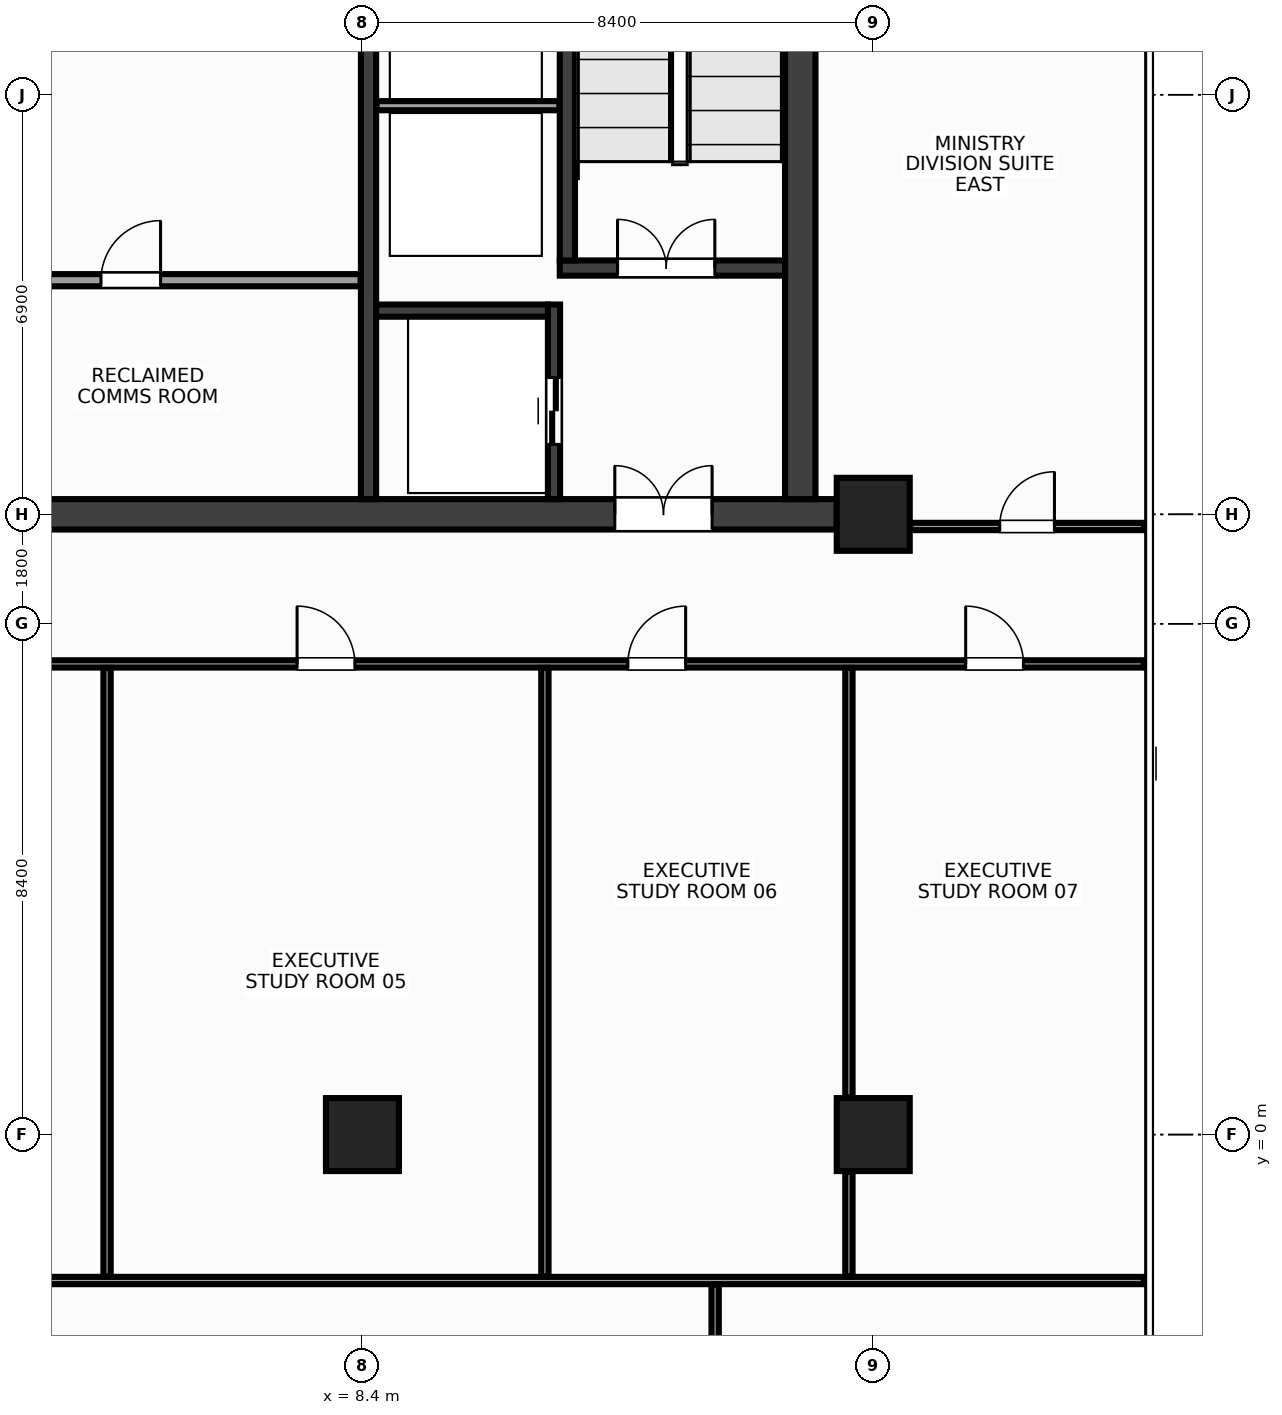
"""IFC4 building model, lengths in metres.
Left out: names, types, materials, properties, quantities, classifications, styles, units other than length and angle.
Written with IfcOpenShell. Run it as: python <this file> out.ifc"""

import sys

from ifc_helpers import new_model, si_unit, direction, frame, frame_2d, origin, origin_2d, place, context, subcontext, project, spatial, rectangle, extrude, source, transform, mapped, element, fill, save


model = new_model("IFC4")
c1 = context("Model", 3, precision=1e-05, world=origin(), true_north=direction((0.0, 1.0)))
c2 = subcontext(c1, "Body", "Model", "MODEL_VIEW")
j1 = project(units=[si_unit("LENGTHUNIT", "METRE"), si_unit("PLANEANGLEUNIT", "RADIAN")], contexts=[c1])
p1 = place(None, origin())
s1 = spatial("IfcSite", under=j1, at=p1, CompositionType="ELEMENT")
p2 = place(p1, origin())
s2 = spatial("IfcBuilding", under=s1, at=p2, CompositionType="ELEMENT")
p3 = place(p2, frame((0.0, 0.0, 275.6)))
s3 = spatial("IfcBuildingStorey", under=s2, at=p3, CompositionType="ELEMENT", Elevation=275.6)
m1 = source(origin(), c2, "Body", "SweptSolid", [
    extrude(rectangle(XDim=32.4, YDim=0.5, at=frame_2d((16.2, 0.0))), origin(), (0.0, 0.0, 1.0), 3.6),
])
p4 = place(p3, frame((-16.2, 10.2, 0.0), z_axis=(0.0, 0.0, 1.0), x_axis=(1.0, 0.0, 0.0)))
e1 = element("IfcWall", 1, at=p4, inside=s3, PredefinedType="SHEAR", context=c2, shape_type="MappedRepresentation", body=[
    mapped(m1, transform((0.0, 0.0, 0.0), x_axis=(1.0, 0.0, 0.0), y_axis=(0.0, 1.0, 0.0), z_axis=(0.0, 0.0, 1.0), scale=1.0)),
])
p5 = place(p4, frame((2.05, 0.0, 0.0)))
e2 = element("IfcOpeningElement", 2, at=p5, cuts=e1, PredefinedType="OPENING", context=c2, shape_type="SweptSolid", body=[
    extrude(rectangle(XDim=1.6, YDim=2.15, at=frame_2d((0.8, 1.075))), frame((0.0, 0.262, 0.0), z_axis=(0.0, -1.0, 0.0), x_axis=(1.0, 0.0, 0.0)), (0.0, 0.0, 1.0), 0.524),
])
p6 = place(p4, frame((28.75, 0.0, 0.0)))
e3 = element("IfcOpeningElement", 3, at=p6, cuts=e1, PredefinedType="OPENING", context=c2, shape_type="SweptSolid", body=[
    extrude(rectangle(XDim=1.6, YDim=2.15, at=frame_2d((0.8, 1.075))), frame((0.0, 0.262, 0.0), z_axis=(0.0, -1.0, 0.0), x_axis=(1.0, 0.0, 0.0)), (0.0, 0.0, 1.0), 0.524),
])
p7 = place(p4, frame((15.45, 0.0, 0.0)))
e4 = element("IfcOpeningElement", 4, at=p7, cuts=e1, PredefinedType="OPENING", context=c2, shape_type="SweptSolid", body=[
    extrude(rectangle(XDim=1.5, YDim=2.2, at=frame_2d((0.75, 1.1))), frame((0.0, 0.262, 0.0), z_axis=(0.0, -1.0, 0.0), x_axis=(1.0, 0.0, 0.0)), (0.0, 0.0, 1.0), 0.524),
])
m2 = source(origin(), c2, "Body", "SweptSolid", [
    extrude(rectangle(XDim=13.1, YDim=0.5, at=frame_2d((6.55, 0.0))), origin(), (0.0, 0.0, 1.0), 3.6),
])
p8 = place(p3, frame((15.6, 10.45, 0.0), z_axis=(0.0, 0.0, 1.0), x_axis=(0.0, 1.0, 0.0)))
e5 = element("IfcWall", 5, at=p8, inside=s3, PredefinedType="SHEAR", context=c2, shape_type="MappedRepresentation", body=[
    mapped(m2, transform((0.0, 0.0, 0.0), x_axis=(1.0, 0.0, 0.0), y_axis=(0.0, 1.0, 0.0), z_axis=(0.0, 0.0, 1.0), scale=1.0)),
])
m3 = source(origin(), c2, "Body", "SweptSolid", [
    extrude(rectangle(XDim=13.1, YDim=0.25, at=frame_2d((6.55, 0.0))), origin(), (0.0, 0.0, 1.0), 3.6),
])
p9 = place(p3, frame((8.5, 10.45, 0.0), z_axis=(0.0, 0.0, 1.0), x_axis=(0.0, 1.0, 0.0)))
e6 = element("IfcWall", 6, at=p9, inside=s3, PredefinedType="SHEAR", context=c2, shape_type="MappedRepresentation", body=[
    mapped(m3, transform((0.0, 0.0, 0.0), x_axis=(1.0, 0.0, 0.0), y_axis=(0.0, 1.0, 0.0), z_axis=(0.0, 0.0, 1.0), scale=1.0)),
])
p10 = place(p9, frame((10.0, 0.0, 0.0)))
e7 = element("IfcOpeningElement", 7, at=p10, cuts=e6, PredefinedType="OPENING", context=c2, shape_type="SweptSolid", body=[
    extrude(rectangle(XDim=0.95, YDim=2.15, at=frame_2d((0.475, 1.075))), frame((0.0, 0.137, 0.0), z_axis=(0.0, -1.0, 0.0), x_axis=(1.0, 0.0, 0.0)), (0.0, 0.0, 1.0), 0.274),
])
m4 = source(origin(), c2, "Body", "SweptSolid", [
    extrude(rectangle(XDim=3.705, YDim=0.25, at=frame_2d((1.853, 0.0))), origin(), (0.0, 0.0, 1.0), 3.6),
])
p11 = place(p3, frame((11.645, 14.25, 0.0), z_axis=(0.0, 0.0, 1.0), x_axis=(1.0, 0.0, 0.0)))
e8 = element("IfcWall", 8, at=p11, inside=s3, PredefinedType="SHEAR", context=c2, shape_type="MappedRepresentation", body=[
    mapped(m4, transform((0.0, 0.0, 0.0), x_axis=(1.0, 0.0, 0.0), y_axis=(0.0, 1.0, 0.0), z_axis=(0.0, 0.0, 1.0), scale=1.0)),
])
p12 = place(p11, frame((0.95, 0.0, 0.0)))
e9 = element("IfcOpeningElement", 9, at=p12, cuts=e8, PredefinedType="OPENING", context=c2, shape_type="SweptSolid", body=[
    extrude(rectangle(XDim=1.6, YDim=2.15, at=frame_2d((0.8, 1.075))), frame((0.0, 0.137, 0.0), z_axis=(0.0, -1.0, 0.0), x_axis=(1.0, 0.0, 0.0)), (0.0, 0.0, 1.0), 0.274),
])
m5 = source(origin(), c2, "Body", "SweptSolid", [
    extrude(rectangle(XDim=9.175, YDim=0.25, at=frame_2d((4.587, 0.0))), origin(), (0.0, 0.0, 1.0), 3.6),
])
p13 = place(p3, frame((11.77, 14.375, 0.0), z_axis=(0.0, 0.0, 1.0), x_axis=(0.0, 1.0, 0.0)))
e10 = element("IfcWall", 10, at=p13, inside=s3, PredefinedType="SHEAR", context=c2, shape_type="MappedRepresentation", body=[
    mapped(m5, transform((0.0, 0.0, 0.0), x_axis=(1.0, 0.0, 0.0), y_axis=(0.0, 1.0, 0.0), z_axis=(0.0, 0.0, 1.0), scale=1.0)),
])
m6 = source(origin(), c2, "Body", "SweptSolid", [
    extrude(rectangle(XDim=3.2, YDim=0.2, at=frame_2d((1.6, 0.0))), origin(), (0.0, 0.0, 1.0), 3.6),
])
p14 = place(p3, frame((11.55, 10.45, 0.0), z_axis=(0.0, 0.0, 1.0), x_axis=(0.0, 1.0, 0.0)))
e11 = element("IfcWall", 11, at=p14, inside=s3, PredefinedType="SHEAR", context=c2, shape_type="MappedRepresentation", body=[
    mapped(m6, transform((0.0, 0.0, 0.0), x_axis=(1.0, 0.0, 0.0), y_axis=(0.0, 1.0, 0.0), z_axis=(0.0, 0.0, 1.0), scale=1.0)),
])
p15 = place(p14, frame((0.9, 0.0, 0.0)))
e12 = element("IfcOpeningElement", 12, at=p15, cuts=e11, PredefinedType="OPENING", context=c2, shape_type="SweptSolid", body=[
    extrude(rectangle(XDim=1.1, YDim=2.15, at=frame_2d((0.55, 1.075))), frame((0.0, 0.112, 0.0), z_axis=(0.0, -1.0, 0.0), x_axis=(1.0, 0.0, 0.0)), (0.0, 0.0, 1.0), 0.224),
])
m7 = source(origin(), c2, "Body", "SweptSolid", [
    extrude(rectangle(XDim=2.825, YDim=0.2, at=frame_2d((1.413, 0.0))), origin(), (0.0, 0.0, 1.0), 3.6),
])
p16 = place(p3, frame((8.625, 13.55, 0.0), z_axis=(0.0, 0.0, 1.0), x_axis=(1.0, 0.0, 0.0)))
e13 = element("IfcWall", 13, at=p16, inside=s3, PredefinedType="SHEAR", context=c2, shape_type="MappedRepresentation", body=[
    mapped(m7, transform((0.0, 0.0, 0.0), x_axis=(1.0, 0.0, 0.0), y_axis=(0.0, 1.0, 0.0), z_axis=(0.0, 0.0, 1.0), scale=1.0)),
])
m8 = source(origin(), c2, "Body", "SweptSolid", [
    extrude(rectangle(XDim=1.2, YDim=1.2, at=origin_2d()), origin(), (0.0, 0.0, 1.0), 3.6),
])
for number, where, z_axis, x_axis in (
    (14, (16.8, 0.0, 0.0), (0.0, 0.0, 1.0), (1.0, 0.0, 0.0)),
    (15, (16.8, 10.2, 0.0), (0.0, 0.0, 1.0), (1.0, 0.0, 0.0)),
    (16, (8.4, 0.0, 0.0), (0.0, 0.0, 1.0), (1.0, 0.0, 0.0)),
):
    element("IfcColumn", number, at=place(p3, frame(where, z_axis=z_axis, x_axis=x_axis)), inside=s3, PredefinedType="COLUMN", context=c2, shape_type="MappedRepresentation", body=[
        mapped(m8, transform((0.0, 0.0, 0.0), x_axis=(1.0, 0.0, 0.0), y_axis=(0.0, 1.0, 0.0), z_axis=(0.0, 0.0, 1.0), scale=1.0)),
    ])
m9 = source(origin(), c2, "Body", "SweptSolid", [
    extrude(rectangle(XDim=3.01, YDim=0.15, at=frame_2d((1.505, 0.0))), origin(), (0.0, 0.0, 1.0), 3.37),
])
p17 = place(p3, frame((8.63, 16.92, 0.0), z_axis=(0.0, 0.0, 1.0), x_axis=(1.0, 0.0, 0.0)))
e17 = element("IfcWall", 17, at=p17, inside=s3, PredefinedType="PARTITIONING", context=c2, shape_type="MappedRepresentation", body=[
    mapped(m9, transform((0.0, 0.0, 0.0), x_axis=(1.0, 0.0, 0.0), y_axis=(0.0, 1.0, 0.0), z_axis=(0.0, 0.0, 1.0), scale=1.0)),
])
m10 = source(origin(), c2, "Body", "SweptSolid", [
    extrude(rectangle(XDim=7.07, YDim=0.2, at=frame_2d((3.535, 0.0))), origin(), (0.0, 0.0, 1.0), 3.37),
])
p18 = place(p3, frame((1.3, 14.05, 0.0), z_axis=(0.0, 0.0, 1.0), x_axis=(1.0, 0.0, 0.0)))
e18 = element("IfcWall", 18, at=p18, inside=s3, PredefinedType="PARTITIONING", context=c2, shape_type="MappedRepresentation", body=[
    mapped(m10, transform((0.0, 0.0, 0.0), x_axis=(1.0, 0.0, 0.0), y_axis=(0.0, 1.0, 0.0), z_axis=(0.0, 0.0, 1.0), scale=1.0)),
])
p19 = place(p18, frame((2.8, 0.0, 0.0)))
e19 = element("IfcOpeningElement", 19, at=p19, cuts=e18, PredefinedType="OPENING", context=c2, shape_type="SweptSolid", body=[
    extrude(rectangle(XDim=0.98, YDim=2.15, at=frame_2d((0.49, 1.075))), frame((0.0, 0.112, 0.0), z_axis=(0.0, -1.0, 0.0), x_axis=(1.0, 0.0, 0.0)), (0.0, 0.0, 1.0), 0.224),
])
m11 = source(origin(), c2, "Body", "SweptSolid", [
    extrude(rectangle(XDim=3.84, YDim=0.12, at=frame_2d((1.92, 0.0))), origin(), (0.0, 0.0, 1.0), 2.805),
])
p20 = place(p3, frame((17.41, 10.0, 0.0), z_axis=(0.0, 0.0, 1.0), x_axis=(1.0, 0.0, 0.0)))
e20 = element("IfcWall", 20, at=p20, inside=s3, PredefinedType="PARTITIONING", context=c2, shape_type="MappedRepresentation", body=[
    mapped(m11, transform((0.0, 0.0, 0.0), x_axis=(1.0, 0.0, 0.0), y_axis=(0.0, 1.0, 0.0), z_axis=(0.0, 0.0, 1.0), scale=1.0)),
])
p21 = place(p20, frame((1.47, 0.0, 0.0)))
e21 = element("IfcOpeningElement", 21, at=p21, cuts=e20, PredefinedType="OPENING", context=c2, shape_type="SweptSolid", body=[
    extrude(rectangle(XDim=0.9, YDim=2.15, at=frame_2d((0.45, 1.075))), frame((0.0, 0.072, 0.0), z_axis=(0.0, -1.0, 0.0), x_axis=(1.0, 0.0, 0.0)), (0.0, 0.0, 1.0), 0.144),
])
m12 = source(origin(), c2, "Body", "SweptSolid", [
    extrude(rectangle(XDim=23.23, YDim=0.12, at=frame_2d((11.615, 0.0))), origin(), (0.0, 0.0, 1.0), 2.755),
])
p22 = place(p3, frame((-1.98, 7.74, 0.0), z_axis=(0.0, 0.0, 1.0), x_axis=(1.0, 0.0, 0.0)))
e22 = element("IfcWall", 22, at=p22, inside=s3, PredefinedType="PARTITIONING", context=c2, shape_type="MappedRepresentation", body=[
    mapped(m12, transform((0.0, 0.0, 0.0), x_axis=(1.0, 0.0, 0.0), y_axis=(0.0, 1.0, 0.0), z_axis=(0.0, 0.0, 1.0), scale=1.0)),
])
p23 = place(p22, frame((2.645, 0.0, 0.0)))
e23 = element("IfcOpeningElement", 23, at=p23, cuts=e22, PredefinedType="OPENING", context=c2, shape_type="SweptSolid", body=[
    extrude(rectangle(XDim=0.95, YDim=2.15, at=frame_2d((0.475, 1.075))), frame((0.0, 0.072, 0.0), z_axis=(0.0, -1.0, 0.0), x_axis=(1.0, 0.0, 0.0)), (0.0, 0.0, 1.0), 0.144),
])
p24 = place(p22, frame((9.305, 0.0, 0.0)))
e24 = element("IfcOpeningElement", 24, at=p24, cuts=e22, PredefinedType="OPENING", context=c2, shape_type="SweptSolid", body=[
    extrude(rectangle(XDim=0.95, YDim=2.15, at=frame_2d((0.475, 1.075))), frame((0.0, 0.072, 0.0), z_axis=(0.0, -1.0, 0.0), x_axis=(1.0, 0.0, 0.0)), (0.0, 0.0, 1.0), 0.144),
])
p25 = place(p22, frame((14.745, 0.0, 0.0)))
e25 = element("IfcOpeningElement", 25, at=p25, cuts=e22, PredefinedType="OPENING", context=c2, shape_type="SweptSolid", body=[
    extrude(rectangle(XDim=0.95, YDim=2.15, at=frame_2d((0.475, 1.075))), frame((0.0, 0.072, 0.0), z_axis=(0.0, -1.0, 0.0), x_axis=(1.0, 0.0, 0.0)), (0.0, 0.0, 1.0), 0.144),
])
p26 = place(p22, frame((20.3, 0.0, 0.0)))
e26 = element("IfcOpeningElement", 26, at=p26, cuts=e22, PredefinedType="OPENING", context=c2, shape_type="SweptSolid", body=[
    extrude(rectangle(XDim=0.95, YDim=2.15, at=frame_2d((0.475, 1.075))), frame((0.0, 0.072, 0.0), z_axis=(0.0, -1.0, 0.0), x_axis=(1.0, 0.0, 0.0)), (0.0, 0.0, 1.0), 0.144),
])
m13 = source(origin(), c2, "Body", "SweptSolid", [
    extrude(rectangle(XDim=23.225, YDim=0.12, at=frame_2d((11.613, 0.0))), origin(), (0.0, 0.0, 1.0), 2.755),
])
p27 = place(p3, frame((-1.975, -2.4, 0.0), z_axis=(0.0, 0.0, 1.0), x_axis=(1.0, 0.0, 0.0)))
e27 = element("IfcWall", 27, at=p27, inside=s3, PredefinedType="PARTITIONING", context=c2, shape_type="MappedRepresentation", body=[
    mapped(m13, transform((0.0, 0.0, 0.0), x_axis=(1.0, 0.0, 0.0), y_axis=(0.0, 1.0, 0.0), z_axis=(0.0, 0.0, 1.0), scale=1.0)),
])
m14 = source(origin(), c2, "Body", "SweptSolid", [
    extrude(rectangle(XDim=10.01, YDim=0.12, at=frame_2d((5.005, 0.0))), origin(), (0.0, 0.0, 1.0), 2.655),
])
for number, where, z_axis, x_axis in (
    (28, (4.2, -2.335, 0.0), (0.0, 0.0, 1.0), (0.0, 1.0, 0.0)),
    (29, (11.4, -2.335, 0.0), (0.0, 0.0, 1.0), (0.0, 1.0, 0.0)),
):
    element("IfcWall", number, at=place(p3, frame(where, z_axis=z_axis, x_axis=x_axis)), inside=s3, PredefinedType="PARTITIONING", context=c2, shape_type="MappedRepresentation", body=[
        mapped(m14, transform((0.0, 0.0, 0.0), x_axis=(1.0, 0.0, 0.0), y_axis=(0.0, 1.0, 0.0), z_axis=(0.0, 0.0, 1.0), scale=1.0)),
    ])
m15 = source(origin(), c2, "Body", "SweptSolid", [
    extrude(rectangle(XDim=1.725, YDim=0.12, at=frame_2d((0.862, 0.0))), origin(), (0.0, 0.0, 1.0), 3.37),
])
p28 = place(p3, frame((16.4, -2.335, 0.0), z_axis=(0.0, 0.0, 1.0), x_axis=(0.0, 1.0, 0.0)))
e30 = element("IfcWall", 30, at=p28, inside=s3, PredefinedType="PARTITIONING", context=c2, shape_type="MappedRepresentation", body=[
    mapped(m15, transform((0.0, 0.0, 0.0), x_axis=(1.0, 0.0, 0.0), y_axis=(0.0, 1.0, 0.0), z_axis=(0.0, 0.0, 1.0), scale=1.0)),
])
m16 = source(origin(), c2, "Body", "SweptSolid", [
    extrude(rectangle(XDim=7.065, YDim=0.12, at=frame_2d((3.532, 0.0))), origin(), (0.0, 0.0, 1.0), 2.655),
])
p29 = place(p3, frame((16.4, 0.61, 0.0), z_axis=(0.0, 0.0, 1.0), x_axis=(0.0, 1.0, 0.0)))
e31 = element("IfcWall", 31, at=p29, inside=s3, PredefinedType="PARTITIONING", context=c2, shape_type="MappedRepresentation", body=[
    mapped(m16, transform((0.0, 0.0, 0.0), x_axis=(1.0, 0.0, 0.0), y_axis=(0.0, 1.0, 0.0), z_axis=(0.0, 0.0, 1.0), scale=1.0)),
])
m17 = source(origin(), c2, "Body", "SweptSolid", [
    extrude(rectangle(XDim=2.96, YDim=0.12, at=frame_2d((1.48, 0.0))), origin(), (0.0, 0.0, 1.0), 3.37),
])
p30 = place(p3, frame((14.2, -5.425, 0.0), z_axis=(0.0, 0.0, 1.0), x_axis=(0.0, 1.0, 0.0)))
e32 = element("IfcWall", 32, at=p30, inside=s3, PredefinedType="PARTITIONING", context=c2, shape_type="MappedRepresentation", body=[
    mapped(m17, transform((0.0, 0.0, 0.0), x_axis=(1.0, 0.0, 0.0), y_axis=(0.0, 1.0, 0.0), z_axis=(0.0, 0.0, 1.0), scale=1.0)),
])
m18 = source(origin(), c2, "Body", "SweptSolid", [
    extrude(rectangle(XDim=1.6, YDim=2.15, at=frame_2d((0.8, 1.075))), frame((0.0, 0.025, 0.0), z_axis=(0.0, -1.0, 0.0), x_axis=(1.0, 0.0, 0.0)), (0.0, 0.0, 1.0), 0.05),
])
p31 = place(p12, origin())
e33 = element("IfcDoor", 33, at=p31, inside=s3, OperationType="DOUBLE_DOOR_SINGLE_SWING", PredefinedType="DOOR", context=c2, shape_type="MappedRepresentation", body=[
    mapped(m18, transform((0.0, 0.0, 0.0), x_axis=(1.0, 0.0, 0.0), y_axis=(0.0, 1.0, 0.0), z_axis=(0.0, 0.0, 1.0), scale=1.0)),
])
fill(e9, e33)
p32 = place(p6, origin())
e34 = element("IfcDoor", 34, at=p32, inside=s3, OperationType="DOUBLE_DOOR_SINGLE_SWING", PredefinedType="DOOR", context=c2, shape_type="MappedRepresentation", body=[
    mapped(m18, transform((0.0, 0.0, 0.0), x_axis=(1.0, 0.0, 0.0), y_axis=(0.0, 1.0, 0.0), z_axis=(0.0, 0.0, 1.0), scale=1.0)),
])
fill(e3, e34)
m19 = source(origin(), c2, "Body", "SweptSolid", [
    extrude(rectangle(XDim=1.1, YDim=2.15, at=frame_2d((0.55, 1.075))), frame((0.0, 0.025, 0.0), z_axis=(0.0, -1.0, 0.0), x_axis=(1.0, 0.0, 0.0)), (0.0, 0.0, 1.0), 0.05),
])
p33 = place(p15, origin())
e35 = element("IfcDoor", 35, at=p33, inside=s3, OperationType="DOUBLE_DOOR_SLIDING", PredefinedType="DOOR", context=c2, shape_type="MappedRepresentation", body=[
    mapped(m19, transform((0.0, 0.0, 0.0), x_axis=(1.0, 0.0, 0.0), y_axis=(0.0, 1.0, 0.0), z_axis=(0.0, 0.0, 1.0), scale=1.0)),
])
fill(e12, e35)
m20 = source(origin(), c2, "Body", "SweptSolid", [
    extrude(rectangle(XDim=0.98, YDim=2.15, at=frame_2d((0.49, 1.075))), frame((0.0, 0.025, 0.0), z_axis=(0.0, -1.0, 0.0), x_axis=(1.0, 0.0, 0.0)), (0.0, 0.0, 1.0), 0.05),
])
p34 = place(p19, origin())
e36 = element("IfcDoor", 36, at=p34, inside=s3, OperationType="SINGLE_SWING_RIGHT", PredefinedType="DOOR", context=c2, shape_type="MappedRepresentation", body=[
    mapped(m20, transform((0.0, 0.0, 0.0), x_axis=(1.0, 0.0, 0.0), y_axis=(0.0, 1.0, 0.0), z_axis=(0.0, 0.0, 1.0), scale=1.0)),
])
fill(e19, e36)
m21 = source(origin(), c2, "Body", "SweptSolid", [
    extrude(rectangle(XDim=0.9, YDim=2.15, at=frame_2d((0.45, 1.075))), frame((0.0, 0.025, 0.0), z_axis=(0.0, -1.0, 0.0), x_axis=(1.0, 0.0, 0.0)), (0.0, 0.0, 1.0), 0.05),
])
p35 = place(p21, origin())
e37 = element("IfcDoor", 37, at=p35, inside=s3, OperationType="SINGLE_SWING_RIGHT", PredefinedType="DOOR", context=c2, shape_type="MappedRepresentation", body=[
    mapped(m21, transform((0.0, 0.0, 0.0), x_axis=(1.0, 0.0, 0.0), y_axis=(0.0, 1.0, 0.0), z_axis=(0.0, 0.0, 1.0), scale=1.0)),
])
fill(e21, e37)
m22 = source(origin(), c2, "Body", "SweptSolid", [
    extrude(rectangle(XDim=0.95, YDim=2.15, at=frame_2d((0.475, 1.075))), frame((0.0, 0.025, 0.0), z_axis=(0.0, -1.0, 0.0), x_axis=(1.0, 0.0, 0.0)), (0.0, 0.0, 1.0), 0.05),
])
p36 = place(p24, origin())
e38 = element("IfcDoor", 38, at=p36, inside=s3, OperationType="SINGLE_SWING_LEFT", PredefinedType="DOOR", context=c2, shape_type="MappedRepresentation", body=[
    mapped(m22, transform((0.0, 0.0, 0.0), x_axis=(1.0, 0.0, 0.0), y_axis=(0.0, 1.0, 0.0), z_axis=(0.0, 0.0, 1.0), scale=1.0)),
])
fill(e24, e38)
p37 = place(p25, origin())
e39 = element("IfcDoor", 39, at=p37, inside=s3, OperationType="SINGLE_SWING_RIGHT", PredefinedType="DOOR", context=c2, shape_type="MappedRepresentation", body=[
    mapped(m22, transform((0.0, 0.0, 0.0), x_axis=(1.0, 0.0, 0.0), y_axis=(0.0, 1.0, 0.0), z_axis=(0.0, 0.0, 1.0), scale=1.0)),
])
fill(e25, e39)
p38 = place(p26, origin())
e40 = element("IfcDoor", 40, at=p38, inside=s3, OperationType="SINGLE_SWING_LEFT", PredefinedType="DOOR", context=c2, shape_type="MappedRepresentation", body=[
    mapped(m22, transform((0.0, 0.0, 0.0), x_axis=(1.0, 0.0, 0.0), y_axis=(0.0, 1.0, 0.0), z_axis=(0.0, 0.0, 1.0), scale=1.0)),
])
fill(e26, e40)
save(model, sys.argv[1])
